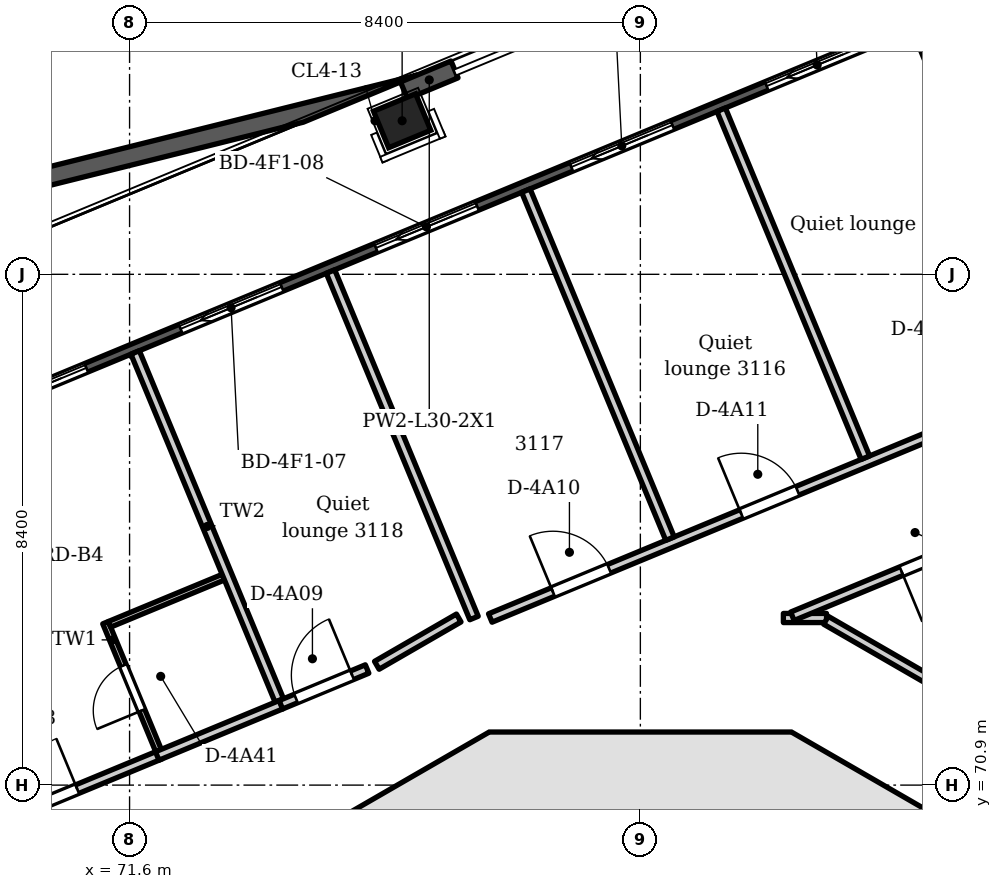
"""IFC4 building model, lengths in metres.
Left out: names, types, materials, properties, quantities, classifications, styles, units other than length and angle.
Written with IfcOpenShell. Run it as: python <this file> out.ifc"""

import sys

from ifc_helpers import new_model, si_unit, direction, frame, frame_2d, origin, origin_2d, place, context, subcontext, project, spatial, polyline, rectangle, outline, extrude, element, fill, save


model = new_model("IFC4")
c1 = context("Model", 3, precision=1e-05, world=origin(), true_north=direction((0.0, 1.0)))
c2 = subcontext(c1, "Body", "Model", "MODEL_VIEW")
j1 = project(units=[si_unit("LENGTHUNIT", "METRE"), si_unit("PLANEANGLEUNIT", "RADIAN")], contexts=[c1])
p1 = place(None, origin())
s1 = spatial("IfcSite", under=j1, at=p1, CompositionType="ELEMENT")
p2 = place(p1, origin())
s2 = spatial("IfcBuilding", under=s1, at=p2, CompositionType="ELEMENT")
p3 = place(p2, frame((0.0, 0.0, 124.2)))
s3 = spatial("IfcBuildingStorey", under=s2, at=p3, CompositionType="ELEMENT", Elevation=124.2)
p4 = place(p3, frame((86.563, 68.898, 0.0), z_axis=(0.0, 0.0, 1.0), x_axis=(-0.866003133579, 0.500038571144, 0.0)))
e1 = element("IfcWall", 1, at=p4, inside=s3, PredefinedType="SHEAR", context=c2, shape_type="SweptSolid", body=[
    extrude(outline(polyline([(0.0, -0.45), (4.969, -0.45), (4.728, 0.45), (0.241, 0.45), (0.0, -0.45)])), origin(), (0.0, 0.0, 1.0), 3.6),
])
p5 = place(p4, frame((1.496, 0.0, 0.0)))
e2 = element("IfcOpeningElement", 2, at=p5, cuts=e1, PredefinedType="OPENING", context=c2, shape_type="SweptSolid", body=[
    extrude(rectangle(XDim=0.9, YDim=2.1, at=frame_2d((0.45, 1.05))), frame((0.0, 0.46, 0.0), z_axis=(0.0, -1.0, 0.0), x_axis=(1.0, 0.0, 0.0)), (0.0, 0.0, 1.0), 0.92),
])
p6 = place(p3, frame((82.485, 71.323, 0.0), z_axis=(0.0, 0.0, 1.0), x_axis=(-1.0, 0.0, 0.0)))
e3 = element("IfcWall", 3, at=p6, inside=s3, PredefinedType="SHEAR", context=c2, shape_type="SweptSolid", body=[
    extrude(outline(polyline([(0.0, -0.45), (4.969, -0.45), (4.728, 0.45), (0.241, 0.45), (0.0, -0.45)])), origin(), (0.0, 0.0, 1.0), 3.6),
])
p7 = place(p6, frame((1.785, 0.0, 0.0)))
e4 = element("IfcOpeningElement", 4, at=p7, cuts=e3, PredefinedType="OPENING", context=c2, shape_type="SweptSolid", body=[
    extrude(rectangle(XDim=1.4, YDim=2.1, at=frame_2d((0.7, 1.05))), frame((0.0, 0.46, 0.0), z_axis=(0.0, -1.0, 0.0), x_axis=(1.0, 0.0, 0.0)), (0.0, 0.0, 1.0), 0.92),
])
p8 = place(p3, frame((77.74, 71.383, 0.0), z_axis=(0.0, 0.0, 1.0), x_axis=(-0.866003133579, -0.500038571144, 0.0)))
e5 = element("IfcWall", 5, at=p8, inside=s3, PredefinedType="SHEAR", context=c2, shape_type="SweptSolid", body=[
    extrude(outline(polyline([(0.0, -0.45), (4.969, -0.45), (4.728, 0.45), (0.241, 0.45), (0.0, -0.45)])), origin(), (0.0, 0.0, 1.0), 3.6),
])
p9 = place(p8, frame((0.895, 0.0, 0.0)))
e6 = element("IfcOpeningElement", 6, at=p9, cuts=e5, PredefinedType="OPENING", context=c2, shape_type="SweptSolid", body=[
    extrude(rectangle(XDim=0.9, YDim=2.1, at=frame_2d((0.45, 1.05))), frame((0.0, 0.46, 0.0), z_axis=(0.0, -1.0, 0.0), x_axis=(1.0, 0.0, 0.0)), (0.0, 0.0, 1.0), 0.92),
])
p10 = place(p8, frame((3.184, 0.0, 0.0)))
e7 = element("IfcOpeningElement", 7, at=p10, cuts=e5, PredefinedType="OPENING", context=c2, shape_type="SweptSolid", body=[
    extrude(rectangle(XDim=0.9, YDim=2.1, at=frame_2d((0.45, 1.05))), frame((0.0, 0.46, 0.0), z_axis=(0.0, -1.0, 0.0), x_axis=(1.0, 0.0, 0.0)), (0.0, 0.0, 1.0), 0.92),
])
for number, where, z_axis, x_axis in (
    (8, (78.425, 63.001, 0.0), (0.0, 0.0, 1.0), (0.0, 1.0, 0.0)),
    (9, (81.575, 63.001, 0.0), (0.0, 0.0, 1.0), (0.0, 1.0, 0.0)),
):
    element("IfcWall", number, at=place(p3, frame(where, z_axis=z_axis, x_axis=x_axis)), inside=s3, PredefinedType="SHEAR", context=c2, shape_type="SweptSolid", body=[
        extrude(rectangle(XDim=7.872, YDim=0.3, at=frame_2d((3.936, 0.0))), origin(), (0.0, 0.0, 1.0), 3.6),
    ])
p11 = place(p3, frame((76.083, 81.825, -0.35), z_axis=(0.0, 0.0, 1.0), x_axis=(0.923879532511, 0.382683432365, 0.0)))
e10 = element("IfcColumn", 10, at=p11, inside=s3, PredefinedType="COLUMN", context=c2, shape_type="SweptSolid", body=[
    extrude(rectangle(XDim=0.75, YDim=0.65, at=origin_2d()), origin(), (0.0, 0.0, 1.0), 3.95),
])
p12 = place(p3, frame((52.387, 70.1, 0.0), z_axis=(0.0, 0.0, 1.0), x_axis=(0.92388051416, 0.382681062447, 0.0)))
e11 = element("IfcWall", 11, at=p12, inside=s3, PredefinedType="SOLIDWALL", context=c2, shape_type="SweptSolid", body=[
    extrude(outline(polyline([(0.149, 0.075), (0.149, -0.075), (45.057, -0.075), (45.057, 0.075), (0.149, 0.075)])), origin(), (0.0, 0.0, 1.0), 3.3),
])
p13 = place(p12, frame((1.239, 0.0, 0.0)))
e12 = element("IfcOpeningElement", 12, at=p13, cuts=e11, PredefinedType="OPENING", context=c2, shape_type="SweptSolid", body=[
    extrude(rectangle(XDim=1.8, YDim=2.6, at=frame_2d((0.9, 1.3))), frame((0.0, 0.085, 0.0), z_axis=(0.0, -1.0, 0.0), x_axis=(1.0, 0.0, 0.0)), (0.0, 0.0, 1.0), 0.17),
])
p14 = place(p12, frame((4.316, 0.0, 0.0)))
e13 = element("IfcOpeningElement", 13, at=p14, cuts=e11, PredefinedType="OPENING", context=c2, shape_type="SweptSolid", body=[
    extrude(rectangle(XDim=1.8, YDim=2.6, at=frame_2d((0.9, 1.3))), frame((0.0, 0.085, 0.0), z_axis=(0.0, -1.0, 0.0), x_axis=(1.0, 0.0, 0.0)), (0.0, 0.0, 1.0), 0.17),
])
p15 = place(p12, frame((7.793, 0.0, 0.0)))
e14 = element("IfcOpeningElement", 14, at=p15, cuts=e11, PredefinedType="OPENING", context=c2, shape_type="SweptSolid", body=[
    extrude(rectangle(XDim=1.8, YDim=2.6, at=frame_2d((0.9, 1.3))), frame((0.0, 0.085, 0.0), z_axis=(0.0, -1.0, 0.0), x_axis=(1.0, 0.0, 0.0)), (0.0, 0.0, 1.0), 0.17),
])
p16 = place(p12, frame((11.271, 0.0, 0.0)))
e15 = element("IfcOpeningElement", 15, at=p16, cuts=e11, PredefinedType="OPENING", context=c2, shape_type="SweptSolid", body=[
    extrude(rectangle(XDim=1.8, YDim=2.6, at=frame_2d((0.9, 1.3))), frame((0.0, 0.085, 0.0), z_axis=(0.0, -1.0, 0.0), x_axis=(1.0, 0.0, 0.0)), (0.0, 0.0, 1.0), 0.17),
])
p17 = place(p12, frame((14.748, 0.0, 0.0)))
e16 = element("IfcOpeningElement", 16, at=p17, cuts=e11, PredefinedType="OPENING", context=c2, shape_type="SweptSolid", body=[
    extrude(rectangle(XDim=1.8, YDim=2.6, at=frame_2d((0.9, 1.3))), frame((0.0, 0.085, 0.0), z_axis=(0.0, -1.0, 0.0), x_axis=(1.0, 0.0, 0.0)), (0.0, 0.0, 1.0), 0.17),
])
p18 = place(p12, frame((18.226, 0.0, 0.0)))
e17 = element("IfcOpeningElement", 17, at=p18, cuts=e11, PredefinedType="OPENING", context=c2, shape_type="SweptSolid", body=[
    extrude(rectangle(XDim=1.8, YDim=2.6, at=frame_2d((0.9, 1.3))), frame((0.0, 0.085, 0.0), z_axis=(0.0, -1.0, 0.0), x_axis=(1.0, 0.0, 0.0)), (0.0, 0.0, 1.0), 0.17),
])
p19 = place(p12, frame((21.703, 0.0, 0.0)))
e18 = element("IfcOpeningElement", 18, at=p19, cuts=e11, PredefinedType="OPENING", context=c2, shape_type="SweptSolid", body=[
    extrude(rectangle(XDim=1.8, YDim=2.6, at=frame_2d((0.9, 1.3))), frame((0.0, 0.085, 0.0), z_axis=(0.0, -1.0, 0.0), x_axis=(1.0, 0.0, 0.0)), (0.0, 0.0, 1.0), 0.17),
])
p20 = place(p12, frame((25.18, 0.0, 0.0)))
e19 = element("IfcOpeningElement", 19, at=p20, cuts=e11, PredefinedType="OPENING", context=c2, shape_type="SweptSolid", body=[
    extrude(rectangle(XDim=1.8, YDim=2.6, at=frame_2d((0.9, 1.3))), frame((0.0, 0.085, 0.0), z_axis=(0.0, -1.0, 0.0), x_axis=(1.0, 0.0, 0.0)), (0.0, 0.0, 1.0), 0.17),
])
p21 = place(p12, frame((28.658, 0.0, 0.0)))
e20 = element("IfcOpeningElement", 20, at=p21, cuts=e11, PredefinedType="OPENING", context=c2, shape_type="SweptSolid", body=[
    extrude(rectangle(XDim=1.8, YDim=2.6, at=frame_2d((0.9, 1.3))), frame((0.0, 0.085, 0.0), z_axis=(0.0, -1.0, 0.0), x_axis=(1.0, 0.0, 0.0)), (0.0, 0.0, 1.0), 0.17),
])
p22 = place(p12, frame((32.135, 0.0, 0.0)))
e21 = element("IfcOpeningElement", 21, at=p22, cuts=e11, PredefinedType="OPENING", context=c2, shape_type="SweptSolid", body=[
    extrude(rectangle(XDim=1.8, YDim=2.6, at=frame_2d((0.9, 1.3))), frame((0.0, 0.085, 0.0), z_axis=(0.0, -1.0, 0.0), x_axis=(1.0, 0.0, 0.0)), (0.0, 0.0, 1.0), 0.17),
])
p23 = place(p12, frame((35.613, 0.0, 0.0)))
e22 = element("IfcOpeningElement", 22, at=p23, cuts=e11, PredefinedType="OPENING", context=c2, shape_type="SweptSolid", body=[
    extrude(rectangle(XDim=1.8, YDim=2.6, at=frame_2d((0.9, 1.3))), frame((0.0, 0.085, 0.0), z_axis=(0.0, -1.0, 0.0), x_axis=(1.0, 0.0, 0.0)), (0.0, 0.0, 1.0), 0.17),
])
p24 = place(p12, frame((39.09, 0.0, 0.0)))
e23 = element("IfcOpeningElement", 23, at=p24, cuts=e11, PredefinedType="OPENING", context=c2, shape_type="SweptSolid", body=[
    extrude(rectangle(XDim=1.8, YDim=2.6, at=frame_2d((0.9, 1.3))), frame((0.0, 0.085, 0.0), z_axis=(0.0, -1.0, 0.0), x_axis=(1.0, 0.0, 0.0)), (0.0, 0.0, 1.0), 0.17),
])
p25 = place(p12, frame((42.167, 0.0, 0.0)))
e24 = element("IfcOpeningElement", 24, at=p25, cuts=e11, PredefinedType="OPENING", context=c2, shape_type="SweptSolid", body=[
    extrude(rectangle(XDim=1.8, YDim=2.6, at=frame_2d((0.9, 1.3))), frame((0.0, 0.085, 0.0), z_axis=(0.0, -1.0, 0.0), x_axis=(1.0, 0.0, 0.0)), (0.0, 0.0, 1.0), 0.17),
])
p26 = place(p3, origin())
e25 = element("IfcWall", 25, at=p26, inside=s3, PredefinedType="PARAPET", context=c2, shape_type="SweptSolid", body=[
    extrude(outline(polyline([(76.333, 82.578), (47.563, 75.405), (47.803, 75.156), (74.457, 81.802), (76.333, 82.578)])), origin(), (0.0, 0.0, 1.0), 1.1),
])
p27 = place(p3, origin())
e26 = element("IfcWall", 26, at=p27, inside=s3, PredefinedType="PARAPET", context=c2, shape_type="SweptSolid", body=[
    extrude(outline(polyline([(76.055, 82.463), (76.17, 82.186), (77.002, 82.531), (76.887, 82.808), (76.716, 82.737), (76.055, 82.463)])), origin(), (0.0, 0.0, 1.0), 1.1),
])
p28 = place(p3, frame((67.662, 69.559, 0.0), z_axis=(0.0, 0.0, 1.0), x_axis=(0.923858526334, 0.382734141827, 0.0)))
e27 = element("IfcWall", 27, at=p28, inside=s3, PredefinedType="PARTITIONING", context=c2, shape_type="SweptSolid", body=[
    extrude(rectangle(XDim=4.812, YDim=0.15, at=frame_2d((2.406, 0.0))), origin(), (0.0, 0.0, 1.0), 3.3),
])
p29 = place(p28, frame((2.431, 0.0, 0.0)))
e28 = element("IfcOpeningElement", 28, at=p29, cuts=e27, PredefinedType="OPENING", context=c2, shape_type="SweptSolid", body=[
    extrude(rectangle(XDim=0.9, YDim=2.1, at=frame_2d((0.45, 1.05))), frame((0.0, 0.085, 0.0), z_axis=(0.0, -1.0, 0.0), x_axis=(1.0, 0.0, 0.0)), (0.0, 0.0, 1.0), 0.17),
])
p30 = place(p3, frame((71.205, 73.571, 0.0), z_axis=(0.0, 0.0, 1.0), x_axis=(0.382557141415, -0.923931833824, 0.0)))
e29 = element("IfcWall", 29, at=p30, inside=s3, PredefinedType="PARTITIONING", context=c2, shape_type="SweptSolid", body=[
    extrude(rectangle(XDim=2.275, YDim=0.1, at=frame_2d((1.138, 0.0))), origin(), (0.0, 0.0, 1.0), 3.3),
])
p31 = place(p30, frame((0.763, 0.0, 0.0)))
e30 = element("IfcOpeningElement", 30, at=p31, cuts=e29, PredefinedType="OPENING", context=c2, shape_type="SweptSolid", body=[
    extrude(rectangle(XDim=0.8, YDim=2.1, at=frame_2d((0.4, 1.05))), frame((0.0, 0.06, 0.0), z_axis=(0.0, -1.0, 0.0), x_axis=(1.0, 0.0, 0.0)), (0.0, 0.0, 1.0), 0.12),
])
p32 = place(p3, frame((71.27, 73.544, 0.0), z_axis=(0.0, 0.0, 1.0), x_axis=(0.923877272036, 0.382688889591, 0.0)))
e31 = element("IfcWall", 31, at=p32, inside=s3, PredefinedType="PARTITIONING", context=c2, shape_type="SweptSolid", body=[
    extrude(rectangle(XDim=2.026, YDim=0.1, at=frame_2d((1.013, 0.0))), origin(), (0.0, 0.0, 1.0), 3.3),
])
p33 = place(p3, frame((71.691, 78.015, 0.0), z_axis=(0.0, 0.0, 1.0), x_axis=(0.38274513347, -0.923853972663, 0.0)))
e32 = element("IfcWall", 32, at=p33, inside=s3, PredefinedType="PARTITIONING", context=c2, shape_type="SweptSolid", body=[
    extrude(rectangle(XDim=6.194, YDim=0.15, at=frame_2d((3.097, 0.0))), origin(), (0.0, 0.0, 1.0), 3.3),
])
p34 = place(p3, frame((72.055, 71.379, 0.0), z_axis=(0.0, 0.0, 1.0), x_axis=(0.923863223013, 0.382722804604, 0.0)))
e33 = element("IfcWall", 33, at=p34, inside=s3, PredefinedType="PARTITIONING", context=c2, shape_type="SweptSolid", body=[
    extrude(rectangle(XDim=2.208, YDim=0.15, at=frame_2d((1.104, 0.0))), origin(), (0.0, 0.0, 1.0), 3.3),
])
p35 = place(p3, frame((74.088, 72.221, 0.0), z_axis=(0.0, 0.0, 1.0), x_axis=(0.923720156635, 0.383067973375, 0.0)))
e34 = element("IfcWall", 34, at=p35, inside=s3, PredefinedType="PARTITIONING", context=c2, shape_type="SweptSolid", body=[
    extrude(rectangle(XDim=1.535, YDim=0.15, at=frame_2d((0.768, 0.0))), origin(), (0.0, 0.0, 1.0), 3.3),
])
p36 = place(p35, frame((0.269, 0.0, 0.0)))
e35 = element("IfcOpeningElement", 35, at=p36, cuts=e34, PredefinedType="OPENING", context=c2, shape_type="SweptSolid", body=[
    extrude(rectangle(XDim=1.0, YDim=2.1, at=frame_2d((0.5, 1.05))), frame((0.0, 0.085, 0.0), z_axis=(0.0, -1.0, 0.0), x_axis=(1.0, 0.0, 0.0)), (0.0, 0.0, 1.0), 0.17),
])
p37 = place(p3, frame((74.904, 79.345, 0.0), z_axis=(0.0, 0.0, 1.0), x_axis=(0.382660672574, -0.923888959597, 0.0)))
e36 = element("IfcWall", 36, at=p37, inside=s3, PredefinedType="PARTITIONING", context=c2, shape_type="SweptSolid", body=[
    extrude(rectangle(XDim=6.166, YDim=0.15, at=frame_2d((3.083, 0.0))), origin(), (0.0, 0.0, 1.0), 3.3),
])
p38 = place(p3, frame((75.666, 72.87, 0.0), z_axis=(0.0, 0.0, 1.0), x_axis=(0.865973841288, 0.500089298231, 0.0)))
e37 = element("IfcWall", 37, at=p38, inside=s3, PredefinedType="PARTITIONING", context=c2, shape_type="SweptSolid", body=[
    extrude(rectangle(XDim=1.555, YDim=0.15, at=frame_2d((0.778, 0.0))), origin(), (0.0, 0.0, 1.0), 3.3),
])
p39 = place(p3, frame((77.532, 73.648, 0.0), z_axis=(0.0, 0.0, 1.0), x_axis=(0.923863379582, 0.382722426659, 0.0)))
e38 = element("IfcWall", 38, at=p39, inside=s3, PredefinedType="PARTITIONING", context=c2, shape_type="SweptSolid", body=[
    extrude(rectangle(XDim=12.139, YDim=0.15, at=frame_2d((6.07, 0.0))), origin(), (0.0, 0.0, 1.0), 3.3),
])
p40 = place(p39, frame((1.116, 0.0, 0.0)))
e39 = element("IfcOpeningElement", 39, at=p40, cuts=e38, PredefinedType="OPENING", context=c2, shape_type="SweptSolid", body=[
    extrude(rectangle(XDim=1.0, YDim=2.1, at=frame_2d((0.5, 1.05))), frame((0.0, 0.085, 0.0), z_axis=(0.0, -1.0, 0.0), x_axis=(1.0, 0.0, 0.0)), (0.0, 0.0, 1.0), 0.17),
])
p41 = place(p39, frame((4.469, 0.0, 0.0)))
e40 = element("IfcOpeningElement", 40, at=p41, cuts=e38, PredefinedType="OPENING", context=c2, shape_type="SweptSolid", body=[
    extrude(rectangle(XDim=1.0, YDim=2.1, at=frame_2d((0.5, 1.05))), frame((0.0, 0.085, 0.0), z_axis=(0.0, -1.0, 0.0), x_axis=(1.0, 0.0, 0.0)), (0.0, 0.0, 1.0), 0.17),
])
p42 = place(p39, frame((7.947, 0.0, 0.0)))
e41 = element("IfcOpeningElement", 41, at=p42, cuts=e38, PredefinedType="OPENING", context=c2, shape_type="SweptSolid", body=[
    extrude(rectangle(XDim=1.0, YDim=2.1, at=frame_2d((0.5, 1.05))), frame((0.0, 0.085, 0.0), z_axis=(0.0, -1.0, 0.0), x_axis=(1.0, 0.0, 0.0)), (0.0, 0.0, 1.0), 0.17),
])
p43 = place(p3, frame((78.117, 80.676, 0.0), z_axis=(0.0, 0.0, 1.0), x_axis=(0.382644207456, -0.923895779025, 0.0)))
e42 = element("IfcWall", 42, at=p43, inside=s3, PredefinedType="PARTITIONING", context=c2, shape_type="SweptSolid", body=[
    extrude(rectangle(XDim=6.194, YDim=0.15, at=frame_2d((3.097, 0.0))), origin(), (0.0, 0.0, 1.0), 3.3),
])
p44 = place(p3, frame((81.329, 82.007, 0.0), z_axis=(0.0, 0.0, 1.0), x_axis=(0.382731197273, -0.923859746192, 0.0)))
e43 = element("IfcWall", 43, at=p44, inside=s3, PredefinedType="PARTITIONING", context=c2, shape_type="SweptSolid", body=[
    extrude(rectangle(XDim=6.195, YDim=0.15, at=frame_2d((3.097, 0.0))), origin(), (0.0, 0.0, 1.0), 3.3),
])
p45 = place(p3, frame((82.352, 73.648, 0.0), z_axis=(0.0, 0.0, 1.0), x_axis=(1.0, 0.0, 0.0)))
e44 = element("IfcWall", 44, at=p45, inside=s3, PredefinedType="PARTITIONING", context=c2, shape_type="SweptSolid", body=[
    extrude(rectangle(XDim=0.71, YDim=0.15, at=frame_2d((0.355, 0.0))), origin(), (0.0, 0.0, 1.0), 3.3),
])
p46 = place(p3, frame((82.5, 73.677, 0.0), z_axis=(0.0, 0.0, 1.0), x_axis=(0.923900404771, 0.382633038384, 0.0)))
e45 = element("IfcWall", 45, at=p46, inside=s3, PredefinedType="PARTITIONING", context=c2, shape_type="SweptSolid", body=[
    extrude(rectangle(XDim=4.856, YDim=0.15, at=frame_2d((2.428, 0.0))), origin(), (0.0, 0.0, 1.0), 3.3),
])
p47 = place(p46, frame((1.94, 0.0, 0.0)))
e46 = element("IfcOpeningElement", 46, at=p47, cuts=e45, PredefinedType="OPENING", context=c2, shape_type="SweptSolid", body=[
    extrude(rectangle(XDim=0.9, YDim=2.1, at=frame_2d((0.45, 1.05))), frame((0.0, 0.085, 0.0), z_axis=(0.0, -1.0, 0.0), x_axis=(1.0, 0.0, 0.0)), (0.0, 0.0, 1.0), 0.17),
])
p48 = place(p3, frame((83.052, 73.611, 0.0), z_axis=(0.0, 0.0, 1.0), x_axis=(0.866011740381, -0.500023664962, 0.0)))
e47 = element("IfcWall", 47, at=p48, inside=s3, PredefinedType="PARTITIONING", context=c2, shape_type="SweptSolid", body=[
    extrude(rectangle(XDim=5.543, YDim=0.15, at=frame_2d((2.771, 0.0))), origin(), (0.0, 0.0, 1.0), 2.7),
])
p49 = place(p48, frame((4.031, 0.0, 0.0)))
e48 = element("IfcOpeningElement", 48, at=p49, cuts=e47, PredefinedType="OPENING", context=c2, shape_type="SweptSolid", body=[
    extrude(rectangle(XDim=1.0, YDim=2.1, at=frame_2d((0.5, 1.05))), frame((0.0, 0.085, 0.0), z_axis=(0.0, -1.0, 0.0), x_axis=(1.0, 0.0, 0.0)), (0.0, 0.0, 1.0), 0.17),
])
p50 = place(p3, frame((84.542, 83.338, 0.0), z_axis=(0.0, 0.0, 1.0), x_axis=(0.382778772429, -0.9238400356, 0.0)))
e49 = element("IfcWall", 49, at=p50, inside=s3, PredefinedType="PARTITIONING", context=c2, shape_type="SweptSolid", body=[
    extrude(rectangle(XDim=6.194, YDim=0.15, at=frame_2d((3.097, 0.0))), origin(), (0.0, 0.0, 1.0), 3.3),
])
p51 = place(p18, origin())
e50 = element("IfcDoor", 50, at=p51, inside=s3, OperationType="SLIDING_TO_LEFT", PredefinedType="DOOR", context=c2, shape_type="SweptSolid", body=[
    extrude(rectangle(XDim=1.8, YDim=2.6, at=frame_2d((0.9, 1.3))), frame((0.0, 0.025, 0.0), z_axis=(0.0, -1.0, 0.0), x_axis=(1.0, 0.0, 0.0)), (0.0, 0.0, 1.0), 0.05),
])
fill(e17, e50)
p52 = place(p19, origin())
e51 = element("IfcDoor", 51, at=p52, inside=s3, OperationType="SLIDING_TO_LEFT", PredefinedType="DOOR", context=c2, shape_type="SweptSolid", body=[
    extrude(rectangle(XDim=1.8, YDim=2.6, at=frame_2d((0.9, 1.3))), frame((0.0, 0.025, 0.0), z_axis=(0.0, -1.0, 0.0), x_axis=(1.0, 0.0, 0.0)), (0.0, 0.0, 1.0), 0.05),
])
fill(e18, e51)
p53 = place(p20, origin())
e52 = element("IfcDoor", 52, at=p53, inside=s3, OperationType="SLIDING_TO_LEFT", PredefinedType="DOOR", context=c2, shape_type="SweptSolid", body=[
    extrude(rectangle(XDim=1.8, YDim=2.6, at=frame_2d((0.9, 1.3))), frame((0.0, 0.025, 0.0), z_axis=(0.0, -1.0, 0.0), x_axis=(1.0, 0.0, 0.0)), (0.0, 0.0, 1.0), 0.05),
])
fill(e19, e52)
p54 = place(p21, origin())
e53 = element("IfcDoor", 53, at=p54, inside=s3, OperationType="SLIDING_TO_LEFT", PredefinedType="DOOR", context=c2, shape_type="SweptSolid", body=[
    extrude(rectangle(XDim=1.8, YDim=2.6, at=frame_2d((0.9, 1.3))), frame((0.0, 0.025, 0.0), z_axis=(0.0, -1.0, 0.0), x_axis=(1.0, 0.0, 0.0)), (0.0, 0.0, 1.0), 0.05),
])
fill(e20, e53)
p55 = place(p22, origin())
e54 = element("IfcDoor", 54, at=p55, inside=s3, OperationType="SLIDING_TO_LEFT", PredefinedType="DOOR", context=c2, shape_type="SweptSolid", body=[
    extrude(rectangle(XDim=1.8, YDim=2.6, at=frame_2d((0.9, 1.3))), frame((0.0, 0.025, 0.0), z_axis=(0.0, -1.0, 0.0), x_axis=(1.0, 0.0, 0.0)), (0.0, 0.0, 1.0), 0.05),
])
fill(e21, e54)
p56 = place(p29, origin())
e55 = element("IfcDoor", 55, at=p56, inside=s3, OperationType="SINGLE_SWING_RIGHT", PredefinedType="DOOR", context=c2, shape_type="SweptSolid", body=[
    extrude(rectangle(XDim=0.9, YDim=2.1, at=frame_2d((0.45, 1.05))), frame((0.0, 0.025, 0.0), z_axis=(0.0, -1.0, 0.0), x_axis=(1.0, 0.0, 0.0)), (0.0, 0.0, 1.0), 0.05),
])
fill(e28, e55)
p57 = place(p36, origin())
e56 = element("IfcDoor", 56, at=p57, inside=s3, OperationType="SINGLE_SWING_RIGHT", PredefinedType="DOOR", context=c2, shape_type="SweptSolid", body=[
    extrude(rectangle(XDim=1.0, YDim=2.1, at=frame_2d((0.5, 1.05))), frame((0.0, 0.025, 0.0), z_axis=(0.0, -1.0, 0.0), x_axis=(1.0, 0.0, 0.0)), (0.0, 0.0, 1.0), 0.05),
])
fill(e35, e56)
p58 = place(p40, origin())
e57 = element("IfcDoor", 57, at=p58, inside=s3, OperationType="SINGLE_SWING_LEFT", PredefinedType="DOOR", context=c2, shape_type="SweptSolid", body=[
    extrude(rectangle(XDim=1.0, YDim=2.1, at=frame_2d((0.5, 1.05))), frame((0.0, 0.025, 0.0), z_axis=(0.0, -1.0, 0.0), x_axis=(1.0, 0.0, 0.0)), (0.0, 0.0, 1.0), 0.05),
])
fill(e39, e57)
p59 = place(p41, origin())
e58 = element("IfcDoor", 58, at=p59, inside=s3, OperationType="SINGLE_SWING_LEFT", PredefinedType="DOOR", context=c2, shape_type="SweptSolid", body=[
    extrude(rectangle(XDim=1.0, YDim=2.1, at=frame_2d((0.5, 1.05))), frame((0.0, 0.025, 0.0), z_axis=(0.0, -1.0, 0.0), x_axis=(1.0, 0.0, 0.0)), (0.0, 0.0, 1.0), 0.05),
])
fill(e40, e58)
p60 = place(p47, frame((0.9, 0.0, 0.0), z_axis=(0.0, 0.0, 1.0), x_axis=(-1.0, 0.0, 0.0)))
e59 = element("IfcDoor", 59, at=p60, inside=s3, OperationType="SINGLE_SWING_RIGHT", PredefinedType="DOOR", context=c2, shape_type="SweptSolid", body=[
    extrude(rectangle(XDim=0.9, YDim=2.1, at=frame_2d((0.45, 1.05))), frame((0.0, 0.025, 0.0), z_axis=(0.0, -1.0, 0.0), x_axis=(1.0, 0.0, 0.0)), (0.0, 0.0, 1.0), 0.05),
])
fill(e46, e59)
p61 = place(p31, frame((0.8, 0.0, 0.0), z_axis=(0.0, 0.0, 1.0), x_axis=(-1.0, 0.0, 0.0)))
e60 = element("IfcDoor", 60, at=p61, inside=s3, OperationType="SINGLE_SWING_LEFT", PredefinedType="DOOR", context=c2, shape_type="SweptSolid", body=[
    extrude(rectangle(XDim=0.8, YDim=2.1, at=frame_2d((0.4, 1.05))), frame((0.0, 0.025, 0.0), z_axis=(0.0, -1.0, 0.0), x_axis=(1.0, 0.0, 0.0)), (0.0, 0.0, 1.0), 0.05),
])
fill(e30, e60)
p62 = place(p7, origin())
e61 = element("IfcDoor", 61, at=p62, inside=s3, OperationType="DOUBLE_DOOR_SINGLE_SWING", PredefinedType="DOOR", context=c2, shape_type="SweptSolid", body=[
    extrude(rectangle(XDim=1.4, YDim=2.1, at=frame_2d((0.7, 1.05))), frame((0.0, 0.025, 0.0), z_axis=(0.0, -1.0, 0.0), x_axis=(1.0, 0.0, 0.0)), (0.0, 0.0, 1.0), 0.05),
])
fill(e4, e61)
p63 = place(p9, origin())
e62 = element("IfcDoor", 62, at=p63, inside=s3, OperationType="SINGLE_SWING_LEFT", PredefinedType="DOOR", context=c2, shape_type="SweptSolid", body=[
    extrude(rectangle(XDim=0.9, YDim=2.1, at=frame_2d((0.45, 1.05))), frame((0.0, 0.175, 0.0), z_axis=(0.0, -1.0, 0.0), x_axis=(1.0, 0.0, 0.0)), (0.0, 0.0, 1.0), 0.05),
])
fill(e6, e62)
save(model, sys.argv[1])
